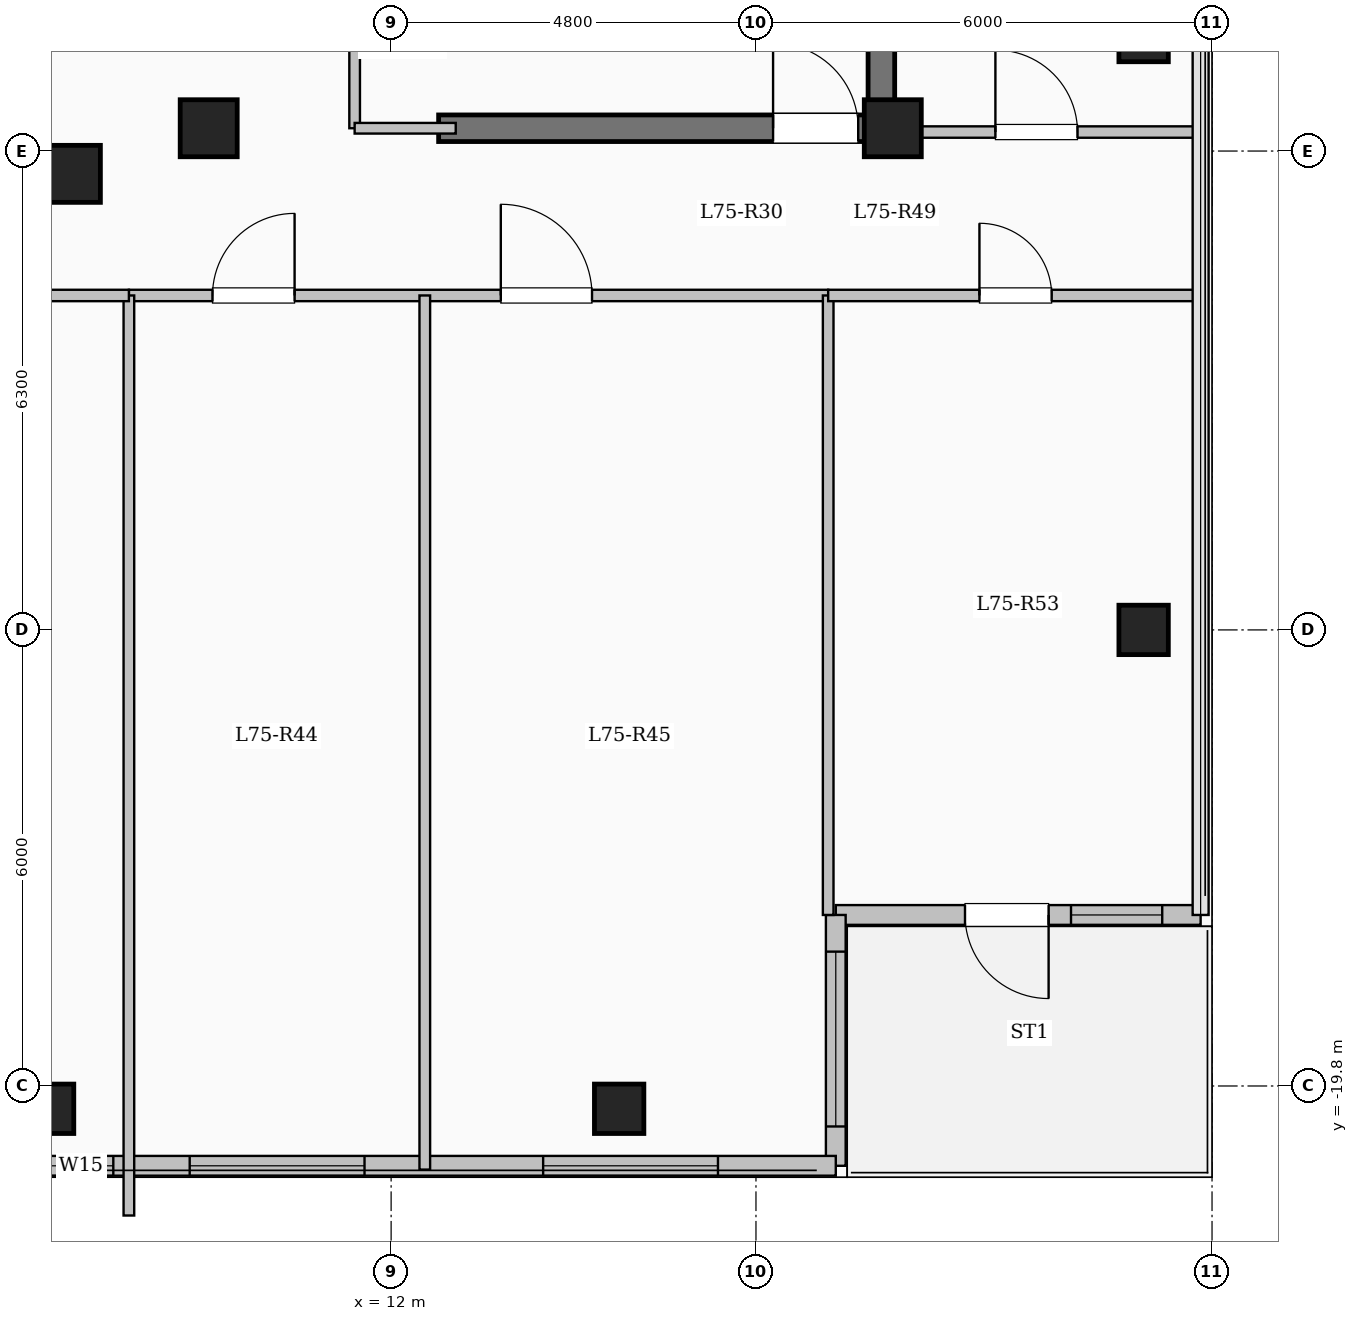
"""IFC4 building model, lengths in metres.
Left out: names, types, materials, properties, quantities, classifications, styles, units other than length and angle.
Written with IfcOpenShell. Run it as: python <this file> out.ifc"""

import sys

from ifc_helpers import new_model, si_unit, direction, frame, frame_2d, origin, origin_2d, place, context, subcontext, project, spatial, rectangle, extrude, element, fill, save


model = new_model("IFC4")
c1 = context("Model", 3, precision=1e-05, world=origin(), true_north=direction((0.0, 1.0)))
c2 = subcontext(c1, "Body", "Model", "MODEL_VIEW")
j1 = project(units=[si_unit("LENGTHUNIT", "METRE"), si_unit("PLANEANGLEUNIT", "RADIAN")], contexts=[c1])
p1 = place(None, origin())
s1 = spatial("IfcSite", under=j1, at=p1, CompositionType="ELEMENT")
p2 = place(p1, origin())
s2 = spatial("IfcBuilding", under=s1, at=p2, CompositionType="ELEMENT")
p3 = place(p2, frame((0.0, 0.0, 276.3)))
s3 = spatial("IfcBuildingStorey", under=s2, at=p3, CompositionType="ELEMENT", Elevation=276.3)
for number, where, z_axis, x_axis in (
    (1, (7.8, -7.8, 0.0), (0.0, 0.0, 1.0), (1.0, 0.0, 0.0)),
    (2, (9.6, -7.2, 0.0), (0.0, 0.0, 1.0), (1.0, 0.0, 0.0)),
    (3, (18.6, -7.2, 0.0), (0.0, 0.0, 1.0), (1.0, 0.0, 0.0)),
):
    element("IfcColumn", number, at=place(p3, frame(where, z_axis=z_axis, x_axis=x_axis)), inside=s3, PredefinedType="COLUMN", context=c2, shape_type="SweptSolid", body=[
        extrude(rectangle(XDim=0.75, YDim=0.75, at=origin_2d()), origin(), (0.0, 0.0, 1.0), 5.25),
    ])
for number, where, z_axis, x_axis in (
    (4, (7.5, -20.1, 0.0), (0.0, 0.0, 1.0), (1.0, 0.0, 0.0)),
    (5, (15.0, -20.1, 0.0), (0.0, 0.0, 1.0), (1.0, 0.0, 0.0)),
    (6, (21.9, -13.8, 0.0), (0.0, 0.0, 1.0), (1.0, 0.0, 0.0)),
    (7, (21.9, -6.0, 0.0), (0.0, 0.0, 1.0), (1.0, 0.0, 0.0)),
):
    element("IfcColumn", number, at=place(p3, frame(where, z_axis=z_axis, x_axis=x_axis)), inside=s3, PredefinedType="COLUMN", context=c2, shape_type="SweptSolid", body=[
        extrude(rectangle(XDim=0.65, YDim=0.65, at=origin_2d()), origin(), (0.0, 0.0, 1.0), 5.25),
    ])
p4 = place(p3, frame((22.65, -17.55, 0.0), z_axis=(0.0, 0.0, 1.0), x_axis=(-1.0, 0.0, 0.0)))
e8 = element("IfcWall", 8, at=p4, inside=s3, PredefinedType="SOLIDWALL", context=c2, shape_type="SweptSolid", body=[
    extrude(rectangle(XDim=4.8, YDim=0.26, at=frame_2d((2.4, 0.0))), origin(), (0.0, 0.0, 1.0), 4.95),
])
p5 = place(p4, frame((2.0, 0.0, 0.0)))
e9 = element("IfcOpeningElement", 9, at=p5, cuts=e8, PredefinedType="OPENING", context=c2, shape_type="SweptSolid", body=[
    extrude(rectangle(XDim=1.1, YDim=2.2, at=frame_2d((0.55, 1.1))), frame((0.0, 0.14, 0.0), z_axis=(0.0, -1.0, 0.0), x_axis=(1.0, 0.0, 0.0)), (0.0, 0.0, 1.0), 0.28),
])
p6 = place(p4, frame((0.505, 0.0, 0.95)))
e10 = element("IfcOpeningElement", 10, at=p6, cuts=e8, PredefinedType="OPENING", context=c2, shape_type="SweptSolid", body=[
    extrude(rectangle(XDim=1.2, YDim=1.5, at=frame_2d((0.6, 0.75))), frame((0.0, 0.14, 0.0), z_axis=(0.0, -1.0, 0.0), x_axis=(1.0, 0.0, 0.0)), (0.0, 0.0, 1.0), 0.28),
])
p7 = place(p3, frame((17.85, -17.55, 0.0), z_axis=(0.0, 0.0, 1.0), x_axis=(0.0, -1.0, 0.0)))
e11 = element("IfcWall", 11, at=p7, inside=s3, PredefinedType="SOLIDWALL", context=c2, shape_type="SweptSolid", body=[
    extrude(rectangle(XDim=3.3, YDim=0.26, at=frame_2d((1.65, 0.0))), origin(), (0.0, 0.0, 1.0), 4.95),
])
p8 = place(p7, frame((0.482, 0.0, 0.85)))
e12 = element("IfcOpeningElement", 12, at=p8, cuts=e11, PredefinedType="OPENING", context=c2, shape_type="SweptSolid", body=[
    extrude(rectangle(XDim=2.3, YDim=2.2, at=frame_2d((1.15, 1.1))), frame((0.0, 0.14, 0.0), z_axis=(0.0, -1.0, 0.0), x_axis=(1.0, 0.0, 0.0)), (0.0, 0.0, 1.0), 0.28),
])
p9 = place(p3, frame((17.85, -20.85, 0.0), z_axis=(0.0, 0.0, 1.0), x_axis=(-1.0, 0.0, 0.0)))
e13 = element("IfcWall", 13, at=p9, inside=s3, PredefinedType="SOLIDWALL", context=c2, shape_type="SweptSolid", body=[
    extrude(rectangle(XDim=10.5, YDim=0.26, at=frame_2d((5.25, 0.0))), origin(), (0.0, 0.0, 1.0), 4.95),
])
p10 = place(p9, frame((1.55, 0.0, 0.85)))
e14 = element("IfcOpeningElement", 14, at=p10, cuts=e13, PredefinedType="OPENING", context=c2, shape_type="SweptSolid", body=[
    extrude(rectangle(XDim=2.3, YDim=2.2, at=frame_2d((1.15, 1.1))), frame((0.0, 0.14, 0.0), z_axis=(0.0, -1.0, 0.0), x_axis=(1.0, 0.0, 0.0)), (0.0, 0.0, 1.0), 0.28),
])
p11 = place(p9, frame((6.2, 0.0, 0.85)))
e15 = element("IfcOpeningElement", 15, at=p11, cuts=e13, PredefinedType="OPENING", context=c2, shape_type="SweptSolid", body=[
    extrude(rectangle(XDim=2.3, YDim=2.2, at=frame_2d((1.15, 1.1))), frame((0.0, 0.14, 0.0), z_axis=(0.0, -1.0, 0.0), x_axis=(1.0, 0.0, 0.0)), (0.0, 0.0, 1.0), 0.28),
])
p12 = place(p9, frame((9.505, 0.0, 0.95)))
e16 = element("IfcOpeningElement", 16, at=p12, cuts=e13, PredefinedType="OPENING", context=c2, shape_type="SweptSolid", body=[
    extrude(rectangle(XDim=0.85, YDim=1.5, at=frame_2d((0.425, 0.75))), frame((0.0, 0.14, 0.0), z_axis=(0.0, -1.0, 0.0), x_axis=(1.0, 0.0, 0.0)), (0.0, 0.0, 1.0), 0.28),
])
p13 = place(p3, frame((18.45, -7.375, 0.0), z_axis=(0.0, 0.0, 1.0), x_axis=(0.0, 1.0, 0.0)))
e17 = element("IfcWall", 17, at=p13, inside=s3, PredefinedType="SHEAR", context=c2, shape_type="SweptSolid", body=[
    extrude(rectangle(XDim=14.05, YDim=0.35, at=frame_2d((7.025, 0.0))), origin(), (0.0, 0.0, 1.0), 5.25),
])
p14 = place(p3, frame((12.625, -7.2, 0.0), z_axis=(0.0, 0.0, 1.0), x_axis=(1.0, 0.0, 0.0)))
e18 = element("IfcWall", 18, at=p14, inside=s3, PredefinedType="SHEAR", context=c2, shape_type="SweptSolid", body=[
    extrude(rectangle(XDim=6.0, YDim=0.35, at=frame_2d((3.0, 0.0))), origin(), (0.0, 0.0, 1.0), 5.25),
])
p15 = place(p14, frame((4.4, 0.0, 0.0)))
e19 = element("IfcOpeningElement", 19, at=p15, cuts=e18, PredefinedType="OPENING", context=c2, shape_type="SweptSolid", body=[
    extrude(rectangle(XDim=1.12, YDim=2.15, at=frame_2d((0.56, 1.075))), frame((0.0, 0.185, 0.0), z_axis=(0.0, -1.0, 0.0), x_axis=(1.0, 0.0, 0.0)), (0.0, 0.0, 1.0), 0.37),
])
p16 = place(p3, frame((11.52, -7.2, 0.0), z_axis=(0.0, 0.0, 1.0), x_axis=(0.0, 1.0, 0.0)))
e20 = element("IfcWall", 20, at=p16, inside=s3, PredefinedType="PARTITIONING", context=c2, shape_type="SweptSolid", body=[
    extrude(rectangle(XDim=9.12, YDim=0.14, at=frame_2d((4.56, 0.0))), origin(), (0.0, 0.0, 1.0), 4.95),
])
p17 = place(p16, frame((1.8, 0.0, 0.0)))
e21 = element("IfcOpeningElement", 21, at=p17, cuts=e20, PredefinedType="OPENING", context=c2, shape_type="SweptSolid", body=[
    extrude(rectangle(XDim=0.9, YDim=2.08, at=frame_2d((0.45, 1.04))), frame((0.0, 0.08, 0.0), z_axis=(0.0, -1.0, 0.0), x_axis=(1.0, 0.0, 0.0)), (0.0, 0.0, 1.0), 0.16),
])
p18 = place(p16, frame((6.2, 0.0, 0.0)))
e22 = element("IfcOpeningElement", 22, at=p18, cuts=e20, PredefinedType="OPENING", context=c2, shape_type="SweptSolid", body=[
    extrude(rectangle(XDim=0.9, YDim=2.08, at=frame_2d((0.45, 1.04))), frame((0.0, 0.08, 0.0), z_axis=(0.0, -1.0, 0.0), x_axis=(1.0, 0.0, 0.0)), (0.0, 0.0, 1.0), 0.16),
])
p19 = place(p3, frame((11.52, -7.2, 0.0), z_axis=(0.0, 0.0, 1.0), x_axis=(1.0, 0.0, 0.0)))
e23 = element("IfcWall", 23, at=p19, inside=s3, PredefinedType="PARTITIONING", context=c2, shape_type="SweptSolid", body=[
    extrude(rectangle(XDim=1.33, YDim=0.14, at=frame_2d((0.665, 0.0))), origin(), (0.0, 0.0, 1.0), 4.085),
])
p20 = place(p3, frame((8.55, -9.4, 0.0), z_axis=(0.0, 0.0, 1.0), x_axis=(1.0, 0.0, 0.0)))
e24 = element("IfcWall", 24, at=p20, inside=s3, PredefinedType="PARTITIONING", context=c2, shape_type="SweptSolid", body=[
    extrude(rectangle(XDim=9.2, YDim=0.15, at=frame_2d((4.6, 0.0))), origin(), (0.0, 0.0, 1.0), 4.95),
])
p21 = place(p20, frame((1.1, 0.0, 0.0)))
e25 = element("IfcOpeningElement", 25, at=p21, cuts=e24, PredefinedType="OPENING", context=c2, shape_type="SweptSolid", body=[
    extrude(rectangle(XDim=1.08, YDim=2.15, at=frame_2d((0.54, 1.075))), frame((0.0, 0.085, 0.0), z_axis=(0.0, -1.0, 0.0), x_axis=(1.0, 0.0, 0.0)), (0.0, 0.0, 1.0), 0.17),
])
p22 = place(p20, frame((4.893, 0.0, 0.0)))
e26 = element("IfcOpeningElement", 26, at=p22, cuts=e24, PredefinedType="OPENING", context=c2, shape_type="SweptSolid", body=[
    extrude(rectangle(XDim=1.2, YDim=2.15, at=frame_2d((0.6, 1.075))), frame((0.0, 0.085, 0.0), z_axis=(0.0, -1.0, 0.0), x_axis=(1.0, 0.0, 0.0)), (0.0, 0.0, 1.0), 0.17),
])
p23 = place(p3, frame((8.55, -21.504, 0.0), z_axis=(0.0, 0.0, 1.0), x_axis=(0.0, 1.0, 0.0)))
e27 = element("IfcWall", 27, at=p23, inside=s3, PredefinedType="PARTITIONING", context=c2, shape_type="SweptSolid", body=[
    extrude(rectangle(XDim=12.104, YDim=0.14, at=frame_2d((6.052, 0.0))), origin(), (0.0, 0.0, 1.0), 4.95),
])
p24 = place(p3, frame((12.443, -20.9, 0.0), z_axis=(0.0, 0.0, 1.0), x_axis=(0.0, 1.0, 0.0)))
e28 = element("IfcWall", 28, at=p24, inside=s3, PredefinedType="PARTITIONING", context=c2, shape_type="SweptSolid", body=[
    extrude(rectangle(XDim=11.5, YDim=0.14, at=frame_2d((5.75, 0.0))), origin(), (0.0, 0.0, 1.0), 4.95),
])
p25 = place(p3, frame((-8.55, -9.4, 0.0), z_axis=(0.0, 0.0, 1.0), x_axis=(1.0, 0.0, 0.0)))
e29 = element("IfcWall", 29, at=p25, inside=s3, PredefinedType="PARTITIONING", context=c2, shape_type="SweptSolid", body=[
    extrude(rectangle(XDim=17.1, YDim=0.15, at=frame_2d((8.55, 0.0))), origin(), (0.0, 0.0, 1.0), 4.95),
])
p26 = place(p25, frame((1.7, 0.0, 0.0)))
e30 = element("IfcOpeningElement", 30, at=p26, cuts=e29, PredefinedType="OPENING", context=c2, shape_type="SweptSolid", body=[
    extrude(rectangle(XDim=1.08, YDim=2.15, at=frame_2d((0.54, 1.075))), frame((0.0, 0.085, 0.0), z_axis=(0.0, -1.0, 0.0), x_axis=(1.0, 0.0, 0.0)), (0.0, 0.0, 1.0), 0.17),
])
p27 = place(p25, frame((10.5, 0.0, 0.0)))
e31 = element("IfcOpeningElement", 31, at=p27, cuts=e29, PredefinedType="OPENING", context=c2, shape_type="SweptSolid", body=[
    extrude(rectangle(XDim=1.08, YDim=2.15, at=frame_2d((0.54, 1.075))), frame((0.0, 0.085, 0.0), z_axis=(0.0, -1.0, 0.0), x_axis=(1.0, 0.0, 0.0)), (0.0, 0.0, 1.0), 0.17),
])
p28 = place(p3, frame((18.45, -7.25, 0.0), z_axis=(0.0, 0.0, 1.0), x_axis=(1.0, 0.0, 0.0)))
e32 = element("IfcWall", 32, at=p28, inside=s3, PredefinedType="PARTITIONING", context=c2, shape_type="SweptSolid", body=[
    extrude(rectangle(XDim=4.23, YDim=0.15, at=frame_2d((2.115, 0.0))), origin(), (0.0, 0.0, 1.0), 4.95),
])
p29 = place(p28, frame((1.5, 0.0, 0.0)))
e33 = element("IfcOpeningElement", 33, at=p29, cuts=e32, PredefinedType="OPENING", context=c2, shape_type="SweptSolid", body=[
    extrude(rectangle(XDim=1.08, YDim=2.15, at=frame_2d((0.54, 1.075))), frame((0.0, 0.085, 0.0), z_axis=(0.0, -1.0, 0.0), x_axis=(1.0, 0.0, 0.0)), (0.0, 0.0, 1.0), 0.17),
])
p30 = place(p3, frame((17.75, -17.55, 0.0), z_axis=(0.0, 0.0, 1.0), x_axis=(0.0, 1.0, 0.0)))
e34 = element("IfcWall", 34, at=p30, inside=s3, PredefinedType="PARTITIONING", context=c2, shape_type="SweptSolid", body=[
    extrude(rectangle(XDim=8.15, YDim=0.14, at=frame_2d((4.075, 0.0))), origin(), (0.0, 0.0, 1.0), 4.95),
])
p31 = place(p3, frame((17.75, -9.4, 0.0), z_axis=(0.0, 0.0, 1.0), x_axis=(1.0, 0.0, 0.0)))
e35 = element("IfcWall", 35, at=p31, inside=s3, PredefinedType="PARTITIONING", context=c2, shape_type="SweptSolid", body=[
    extrude(rectangle(XDim=4.93, YDim=0.15, at=frame_2d((2.465, 0.0))), origin(), (0.0, 0.0, 1.0), 4.95),
])
p32 = place(p31, frame((1.99, 0.0, 0.0)))
e36 = element("IfcOpeningElement", 36, at=p32, cuts=e35, PredefinedType="OPENING", context=c2, shape_type="SweptSolid", body=[
    extrude(rectangle(XDim=0.95, YDim=2.15, at=frame_2d((0.475, 1.075))), frame((0.0, 0.085, 0.0), z_axis=(0.0, -1.0, 0.0), x_axis=(1.0, 0.0, 0.0)), (0.0, 0.0, 1.0), 0.17),
])
p33 = place(p5, origin())
e37 = element("IfcDoor", 37, at=p33, inside=s3, OperationType="SINGLE_SWING_LEFT", PredefinedType="DOOR", context=c2, shape_type="SweptSolid", body=[
    extrude(rectangle(XDim=1.1, YDim=2.2, at=frame_2d((0.55, 1.1))), frame((0.0, 0.025, 0.0), z_axis=(0.0, -1.0, 0.0), x_axis=(1.0, 0.0, 0.0)), (0.0, 0.0, 1.0), 0.05),
])
fill(e9, e37)
p34 = place(p6, origin())
e38 = element("IfcWindow", 38, at=p34, inside=s3, PartitioningType="SINGLE_PANEL", PredefinedType="WINDOW", context=c2, shape_type="SweptSolid", body=[
    extrude(rectangle(XDim=1.2, YDim=1.5, at=frame_2d((0.6, 0.75))), frame((0.0, 0.03, 0.0), z_axis=(0.0, -1.0, 0.0), x_axis=(1.0, 0.0, 0.0)), (0.0, 0.0, 1.0), 0.06),
])
fill(e10, e38)
p35 = place(p8, origin())
e39 = element("IfcWindow", 39, at=p35, inside=s3, PartitioningType="SINGLE_PANEL", PredefinedType="WINDOW", context=c2, shape_type="SweptSolid", body=[
    extrude(rectangle(XDim=2.3, YDim=2.2, at=frame_2d((1.15, 1.1))), frame((0.0, 0.03, 0.0), z_axis=(0.0, -1.0, 0.0), x_axis=(1.0, 0.0, 0.0)), (0.0, 0.0, 1.0), 0.06),
])
fill(e12, e39)
p36 = place(p10, origin())
e40 = element("IfcWindow", 40, at=p36, inside=s3, PartitioningType="SINGLE_PANEL", PredefinedType="WINDOW", context=c2, shape_type="SweptSolid", body=[
    extrude(rectangle(XDim=2.3, YDim=2.2, at=frame_2d((1.15, 1.1))), frame((0.0, 0.03, 0.0), z_axis=(0.0, -1.0, 0.0), x_axis=(1.0, 0.0, 0.0)), (0.0, 0.0, 1.0), 0.06),
])
fill(e14, e40)
p37 = place(p11, origin())
e41 = element("IfcWindow", 41, at=p37, inside=s3, PartitioningType="SINGLE_PANEL", PredefinedType="WINDOW", context=c2, shape_type="SweptSolid", body=[
    extrude(rectangle(XDim=2.3, YDim=2.2, at=frame_2d((1.15, 1.1))), frame((0.0, 0.03, 0.0), z_axis=(0.0, -1.0, 0.0), x_axis=(1.0, 0.0, 0.0)), (0.0, 0.0, 1.0), 0.06),
])
fill(e15, e41)
p38 = place(p12, origin())
e42 = element("IfcWindow", 42, at=p38, inside=s3, PartitioningType="SINGLE_PANEL", PredefinedType="WINDOW", context=c2, shape_type="SweptSolid", body=[
    extrude(rectangle(XDim=0.85, YDim=1.5, at=frame_2d((0.425, 0.75))), frame((0.0, 0.03, 0.0), z_axis=(0.0, -1.0, 0.0), x_axis=(1.0, 0.0, 0.0)), (0.0, 0.0, 1.0), 0.06),
])
fill(e16, e42)
p39 = place(p15, origin())
e43 = element("IfcDoor", 43, at=p39, inside=s3, OperationType="SINGLE_SWING_LEFT", PredefinedType="DOOR", context=c2, shape_type="SweptSolid", body=[
    extrude(rectangle(XDim=1.12, YDim=2.15, at=frame_2d((0.56, 1.075))), frame((0.0, 0.025, 0.0), z_axis=(0.0, -1.0, 0.0), x_axis=(1.0, 0.0, 0.0)), (0.0, 0.0, 1.0), 0.05),
])
fill(e19, e43)
p40 = place(p21, origin())
e44 = element("IfcDoor", 44, at=p40, inside=s3, OperationType="SINGLE_SWING_RIGHT", PredefinedType="DOOR", context=c2, shape_type="SweptSolid", body=[
    extrude(rectangle(XDim=1.08, YDim=2.15, at=frame_2d((0.54, 1.075))), frame((0.0, 0.025, 0.0), z_axis=(0.0, -1.0, 0.0), x_axis=(1.0, 0.0, 0.0)), (0.0, 0.0, 1.0), 0.05),
])
fill(e25, e44)
p41 = place(p22, origin())
e45 = element("IfcDoor", 45, at=p41, inside=s3, OperationType="SINGLE_SWING_LEFT", PredefinedType="DOOR", context=c2, shape_type="SweptSolid", body=[
    extrude(rectangle(XDim=1.2, YDim=2.15, at=frame_2d((0.6, 1.075))), frame((0.0, 0.025, 0.0), z_axis=(0.0, -1.0, 0.0), x_axis=(1.0, 0.0, 0.0)), (0.0, 0.0, 1.0), 0.05),
])
fill(e26, e45)
p42 = place(p32, origin())
e46 = element("IfcDoor", 46, at=p42, inside=s3, OperationType="SINGLE_SWING_LEFT", PredefinedType="DOOR", context=c2, shape_type="SweptSolid", body=[
    extrude(rectangle(XDim=0.95, YDim=2.15, at=frame_2d((0.475, 1.075))), frame((0.0, 0.025, 0.0), z_axis=(0.0, -1.0, 0.0), x_axis=(1.0, 0.0, 0.0)), (0.0, 0.0, 1.0), 0.05),
])
fill(e36, e46)
p43 = place(p29, origin())
e47 = element("IfcDoor", 47, at=p43, inside=s3, OperationType="SINGLE_SWING_LEFT", PredefinedType="DOOR", context=c2, shape_type="SweptSolid", body=[
    extrude(rectangle(XDim=1.08, YDim=2.15, at=frame_2d((0.54, 1.075))), frame((0.0, 0.025, 0.0), z_axis=(0.0, -1.0, 0.0), x_axis=(1.0, 0.0, 0.0)), (0.0, 0.0, 1.0), 0.05),
])
fill(e33, e47)
save(model, sys.argv[1])
